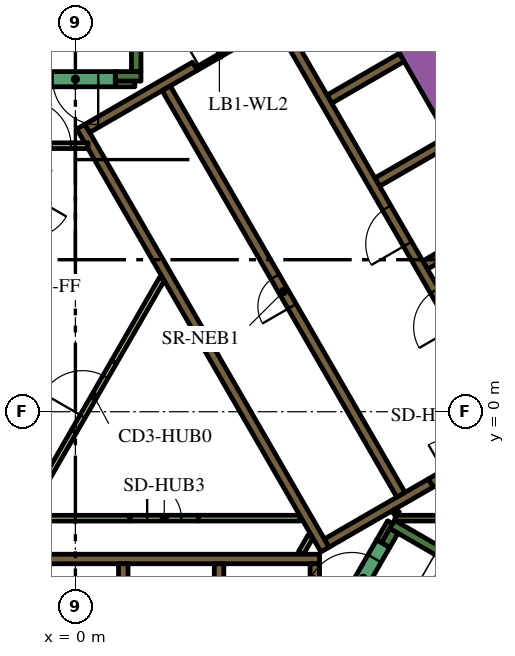
"""IFC4 building model, lengths in metres.
Left out: names, types, materials, properties, quantities, classifications, styles, units other than length and angle.
Written with IfcOpenShell. Run it as: python <this file> out.ifc"""

import sys

from ifc_helpers import new_model, si_unit, direction, frame, frame_2d, origin, place, context, subcontext, project, spatial, polyline, rectangle, outline, extrude, element, fill, save


model = new_model("IFC4")
c1 = context("Model", 3, precision=1e-05, world=origin(), true_north=direction((0.0, 1.0)))
c2 = subcontext(c1, "Body", "Model", "MODEL_VIEW")
j1 = project(units=[si_unit("LENGTHUNIT", "METRE"), si_unit("PLANEANGLEUNIT", "RADIAN")], contexts=[c1])
p1 = place(None, origin())
s1 = spatial("IfcSite", under=j1, at=p1, CompositionType="ELEMENT")
p2 = place(p1, origin())
s2 = spatial("IfcBuilding", under=s1, at=p2, CompositionType="ELEMENT")
p3 = place(p2, frame((0.0, 0.0, 126.6)))
s3 = spatial("IfcBuildingStorey", under=s2, at=p3, CompositionType="ELEMENT", Elevation=126.6)
p4 = place(p3, frame((6.776, 13.364, 0.0), z_axis=(0.0, 0.0, 1.0), x_axis=(0.500004177138, -0.8660229921, 0.0)))
e1 = element("IfcWall", 1, at=p4, inside=s3, PredefinedType="SOLIDWALL", context=c2, shape_type="SweptSolid", body=[
    extrude(rectangle(XDim=20.204, YDim=0.9, at=frame_2d((10.102, 0.0))), origin(), (0.0, 0.0, 1.0), 3.9),
])
p5 = place(p3, frame((8.334, -2.964, 0.0), z_axis=(0.0, 0.0, 1.0), x_axis=(0.866016039709, -0.500016218704, 0.0)))
e2 = element("IfcWall", 2, at=p5, inside=s3, PredefinedType="SOLIDWALL", context=c2, shape_type="SweptSolid", body=[
    extrude(rectangle(XDim=7.05, YDim=0.25, at=frame_2d((3.525, 0.0))), origin(), (0.0, 0.0, 1.0), 3.9),
])
p6 = place(p3, frame((8.163, -3.511, 0.0), z_axis=(0.0, 0.0, 1.0), x_axis=(0.500127794843, 0.865951608824, 0.0)))
e3 = element("IfcWall", 3, at=p6, inside=s3, PredefinedType="SOLIDWALL", context=c2, shape_type="SweptSolid", body=[
    extrude(rectangle(XDim=0.435, YDim=0.25, at=frame_2d((0.217, 0.0))), origin(), (0.0, 0.0, 1.0), 3.9),
])
p7 = place(p3, frame((1.6, 8.95, 0.0), z_axis=(0.0, 0.0, 1.0), x_axis=(0.0, 1.0, 0.0)))
e4 = element("IfcWall", 4, at=p7, inside=s3, PredefinedType="SOLIDWALL", context=c2, shape_type="SweptSolid", body=[
    extrude(rectangle(XDim=6.8, YDim=0.25, at=frame_2d((3.4, 0.0))), origin(), (0.0, 0.0, 1.0), 3.9),
])
p8 = place(p3, frame((1.05, 8.825, 0.0), z_axis=(0.0, 0.0, 1.0), x_axis=(1.0, 0.0, 0.0)))
e5 = element("IfcWall", 5, at=p8, inside=s3, PredefinedType="SOLIDWALL", context=c2, shape_type="SweptSolid", body=[
    extrude(rectangle(XDim=0.675, YDim=0.25, at=frame_2d((0.337, 0.0))), origin(), (0.0, 0.0, 1.0), 3.9),
])
p9 = place(p3, frame((-6.19, -3.875, 0.0), z_axis=(0.0, 0.0, 1.0), x_axis=(1.0, 0.0, 0.0)))
e6 = element("IfcWall", 6, at=p9, inside=s3, PredefinedType="SOLIDWALL", context=c2, shape_type="SweptSolid", body=[
    extrude(rectangle(XDim=12.615, YDim=0.25, at=frame_2d((6.307, 0.0))), origin(), (0.0, 0.0, 1.0), 3.9),
])
p10 = place(p3, frame((6.3, -7.268, 0.0), z_axis=(0.0, 0.0, 1.0), x_axis=(0.0, 1.0, 0.0)))
e7 = element("IfcWall", 7, at=p10, inside=s3, PredefinedType="SOLIDWALL", context=c2, shape_type="SweptSolid", body=[
    extrude(rectangle(XDim=3.268, YDim=0.25, at=frame_2d((1.634, 0.0))), origin(), (0.0, 0.0, 1.0), 3.9),
])
for number, where, z_axis, x_axis in (
    (8, (3.78, -4.0, 0.0), (0.0, 0.0, 1.0), (0.0, -1.0, 0.0)),
    (9, (1.26, -4.0, 0.0), (0.0, 0.0, 1.0), (0.0, -1.0, 0.0)),
):
    element("IfcWall", number, at=place(p3, frame(where, z_axis=z_axis, x_axis=x_axis)), inside=s3, PredefinedType="SOLIDWALL", context=c2, shape_type="SweptSolid", body=[
        extrude(rectangle(XDim=2.2, YDim=0.25, at=frame_2d((1.1, 0.0))), origin(), (0.0, 0.0, 1.0), 3.9),
    ])
p11 = place(p3, origin())
e10 = element("IfcWall", 10, at=p11, inside=s3, PredefinedType="SOLIDWALL", context=c2, shape_type="SweptSolid", body=[
    extrude(outline(polyline([(0.335, 6.925), (0.335, 6.925), (0.335, 7.075), (0.335, 7.075), (0.335, 7.075), (0.245, 7.075), (0.079, 7.363), (0.035, 7.439), (0.252, 7.564), (0.377, 7.348), (6.552, -3.348), (6.677, -3.564), (6.46, -3.689), (4.897, -0.981), (0.332, 6.925), (0.335, 6.925), (0.335, 6.925)])), origin(), (0.0, 0.0, 1.0), 3.9),
])
p12 = place(p3, frame((0.314, 7.456, 0.0), z_axis=(0.0, 0.0, 1.0), x_axis=(0.866013897511, 0.50001992892, 0.0)))
e11 = element("IfcWall", 11, at=p12, inside=s3, PredefinedType="SOLIDWALL", context=c2, shape_type="SweptSolid", body=[
    extrude(rectangle(XDim=3.268, YDim=0.25, at=frame_2d((1.634, 0.0))), origin(), (0.0, 0.0, 1.0), 3.9),
])
p13 = place(p3, frame((9.352, -1.875, 0.0), z_axis=(0.0, 0.0, 1.0), x_axis=(-0.866024844342, -0.500000968981, 0.0)))
e12 = element("IfcWall", 12, at=p13, inside=s3, PredefinedType="SOLIDWALL", context=c2, shape_type="SweptSolid", body=[
    extrude(rectangle(XDim=3.162, YDim=0.25, at=frame_2d((1.581, 0.0))), origin(), (0.0, 0.0, 1.0), 3.9),
])
for number, where, z_axis, x_axis in (
    (13, (6.684, 8.224, 0.0), (0.0, 0.0, 1.0), (0.866, 0.5, 0.0)),
    (14, (7.944, 6.041, 0.0), (0.0, 0.0, 1.0), (0.866, 0.5, 0.0)),
    (15, (9.204, 3.859, 0.0), (0.0, 0.0, 1.0), (0.866, 0.5, 0.0)),
):
    element("IfcWall", number, at=place(p3, frame(where, z_axis=z_axis, x_axis=x_axis)), inside=s3, PredefinedType="SOLIDWALL", context=c2, shape_type="SweptSolid", body=[
        extrude(rectangle(XDim=2.2, YDim=0.25, at=frame_2d((1.1, 0.0))), origin(), (0.0, 0.0, 1.0), 3.9),
    ])
p14 = place(p3, frame((-6.086, -2.801, 0.0), z_axis=(0.0, 0.0, 1.0), x_axis=(1.0, 0.0, 0.0)))
e16 = element("IfcWall", 16, at=p14, inside=s3, PredefinedType="PARTITIONING", context=c2, shape_type="SweptSolid", body=[
    extrude(rectangle(XDim=7.524, YDim=0.15, at=frame_2d((3.762, 0.0))), origin(), (0.0, 0.0, 1.0), 2.75),
])
p15 = place(p3, frame((-1.208, -2.544, 0.0), z_axis=(0.0, 0.0, 1.0), x_axis=(0.499995339376, 0.86602809458, 0.0)))
e17 = element("IfcWall", 17, at=p15, inside=s3, PredefinedType="PARTITIONING", context=c2, shape_type="SweptSolid", body=[
    extrude(rectangle(XDim=2.349, YDim=0.15, at=frame_2d((1.175, 0.0))), origin(), (0.0, 0.0, 1.0), 2.75),
])
p16 = place(p3, frame((5.936, -3.718, 0.0), z_axis=(0.0, 0.0, 1.0), x_axis=(0.499890179513, 0.866088799389, 0.0)))
e18 = element("IfcWall", 18, at=p16, inside=s3, PredefinedType="PARTITIONING", context=c2, shape_type="SweptSolid", body=[
    extrude(rectangle(XDim=0.504, YDim=0.15, at=frame_2d((0.252, 0.0))), origin(), (0.0, 0.0, 1.0), 2.75),
])
p17 = place(p3, frame((8.412, -2.8, 0.0), z_axis=(0.0, 0.0, 1.0), x_axis=(1.0, 0.0, 0.0)))
e19 = element("IfcWall", 19, at=p17, inside=s3, PredefinedType="PARTITIONING", context=c2, shape_type="SweptSolid", body=[
    extrude(rectangle(XDim=2.702, YDim=0.15, at=frame_2d((1.351, 0.0))), origin(), (0.0, 0.0, 1.0), 3.9),
])
p18 = place(p3, frame((8.459, -2.599, 0.0), z_axis=(0.0, 0.0, 1.0), x_axis=(-0.501919277433, -0.864914469148, 0.0)))
e20 = element("IfcWall", 20, at=p18, inside=s3, PredefinedType="PARTITIONING", context=c2, shape_type="SweptSolid", body=[
    extrude(rectangle(XDim=0.109, YDim=0.15, at=frame_2d((0.054, 0.0))), origin(), (0.0, 0.0, 1.0), 3.9),
])
p19 = place(p3, frame((8.281, -2.907, 0.0), z_axis=(0.0, 0.0, 1.0), x_axis=(-0.500193841991, -0.86591346013, 0.0)))
e21 = element("IfcWall", 21, at=p19, inside=s3, PredefinedType="PARTITIONING", context=c2, shape_type="SweptSolid", body=[
    extrude(rectangle(XDim=0.583, YDim=0.15, at=frame_2d((0.292, 0.0))), origin(), (0.0, 0.0, 1.0), 3.9),
])
p20 = place(p3, frame((3.238, -2.8, 0.0), z_axis=(0.0, 0.0, 1.0), x_axis=(1.0, 0.0, 0.0)))
e22 = element("IfcWall", 22, at=p20, inside=s3, PredefinedType="PARTITIONING", context=c2, shape_type="SweptSolid", body=[
    extrude(rectangle(XDim=2.672, YDim=0.15, at=frame_2d((1.336, 0.0))), origin(), (0.0, 0.0, 1.0), 2.75),
])
p21 = place(p3, frame((1.016, 1.309, 0.0), z_axis=(0.0, 0.0, 1.0), x_axis=(0.49998231768, 0.866035612436, 0.0)))
e23 = element("IfcWall", 23, at=p21, inside=s3, PredefinedType="PARTITIONING", context=c2, shape_type="SweptSolid", body=[
    extrude(rectangle(XDim=2.521, YDim=0.15, at=frame_2d((1.26, 0.0))), origin(), (0.0, 0.0, 1.0), 2.75),
])
p22 = place(p3, frame((1.05, 8.625, 0.0), z_axis=(0.0, 0.0, 1.0), x_axis=(1.0, 0.0, 0.0)))
e24 = element("IfcWall", 24, at=p22, inside=s3, PredefinedType="PARTITIONING", context=c2, shape_type="SweptSolid", body=[
    extrude(rectangle(XDim=0.514, YDim=0.15, at=frame_2d((0.257, 0.0))), origin(), (0.0, 0.0, 1.0), 2.75),
])
p23 = place(p3, frame((11.553, -0.46, 0.0), z_axis=(0.0, 0.0, 1.0), x_axis=(-0.500006514828, 0.866021642414, 0.0)))
e25 = element("IfcWall", 25, at=p23, inside=s3, PredefinedType="SOLIDWALL", context=c2, shape_type="SweptSolid", body=[
    extrude(rectangle(XDim=12.35, YDim=0.25, at=frame_2d((6.175, 0.0))), origin(), (0.0, 0.0, 1.0), 3.9),
])
p24 = place(p23, frame((0.585, 0.0, 0.0)))
e26 = element("IfcOpeningElement", 26, at=p24, cuts=e25, PredefinedType="OPENING", context=c2, shape_type="SweptSolid", body=[
    extrude(rectangle(XDim=1.1, YDim=2.1, at=frame_2d((0.55, 1.05))), frame((0.0, 0.135, 0.0), z_axis=(0.0, -1.0, 0.0), x_axis=(1.0, 0.0, 0.0)), (0.0, 0.0, 1.0), 0.27),
])
p25 = place(p23, frame((3.105, 0.0, 0.0)))
e27 = element("IfcOpeningElement", 27, at=p25, cuts=e25, PredefinedType="OPENING", context=c2, shape_type="SweptSolid", body=[
    extrude(rectangle(XDim=1.1, YDim=2.1, at=frame_2d((0.55, 1.05))), frame((0.0, 0.135, 0.0), z_axis=(0.0, -1.0, 0.0), x_axis=(1.0, 0.0, 0.0)), (0.0, 0.0, 1.0), 0.27),
])
p26 = place(p23, frame((5.625, 0.0, 0.0)))
e28 = element("IfcOpeningElement", 28, at=p26, cuts=e25, PredefinedType="OPENING", context=c2, shape_type="SweptSolid", body=[
    extrude(rectangle(XDim=1.1, YDim=2.1, at=frame_2d((0.55, 1.05))), frame((0.0, 0.135, 0.0), z_axis=(0.0, -1.0, 0.0), x_axis=(1.0, 0.0, 0.0)), (0.0, 0.0, 1.0), 0.27),
])
p27 = place(p3, frame((8.565, -2.185, 0.0), z_axis=(0.0, 0.0, 1.0), x_axis=(-0.499997954832, 0.866026584559, 0.0)))
e29 = element("IfcWall", 29, at=p27, inside=s3, PredefinedType="SOLIDWALL", context=c2, shape_type="SweptSolid", body=[
    extrude(rectangle(XDim=12.35, YDim=0.25, at=frame_2d((6.175, 0.0))), origin(), (0.0, 0.0, 1.0), 3.9),
])
p28 = place(p27, frame((5.725, 0.0, 0.0)))
e30 = element("IfcOpeningElement", 30, at=p28, cuts=e29, PredefinedType="OPENING", context=c2, shape_type="SweptSolid", body=[
    extrude(rectangle(XDim=0.9, YDim=2.1, at=frame_2d((0.45, 1.05))), frame((0.0, 0.135, 0.0), z_axis=(0.0, -1.0, 0.0), x_axis=(1.0, 0.0, 0.0)), (0.0, 0.0, 1.0), 0.27),
])
p29 = place(p3, frame((7.048, -5.292, 0.0), z_axis=(0.0, 0.0, 1.0), x_axis=(0.49994051562, 0.866059744384, 0.0)))
e31 = element("IfcWall", 31, at=p29, inside=s3, PredefinedType="SOLIDWALL", context=c2, shape_type="SweptSolid", body=[
    extrude(rectangle(XDim=2.1, YDim=0.4, at=frame_2d((1.05, 0.0))), origin(), (0.0, 0.0, 1.0), 3.9),
])
p30 = place(p29, frame((0.45, 0.0, 0.0)))
e32 = element("IfcOpeningElement", 32, at=p30, cuts=e31, PredefinedType="OPENING", context=c2, shape_type="SweptSolid", body=[
    extrude(rectangle(XDim=1.2, YDim=2.1, at=frame_2d((0.6, 1.05))), frame((0.0, 0.21, 0.0), z_axis=(0.0, -1.0, 0.0), x_axis=(1.0, 0.0, 0.0)), (0.0, 0.0, 1.0), 0.42),
])
p31 = place(p3, frame((1.05, 8.75, 0.0), z_axis=(0.0, 0.0, 1.0), x_axis=(-1.0, 0.0, 0.0)))
e33 = element("IfcWall", 33, at=p31, inside=s3, PredefinedType="SOLIDWALL", context=c2, shape_type="SweptSolid", body=[
    extrude(rectangle(XDim=2.1, YDim=0.4, at=frame_2d((1.05, 0.0))), origin(), (0.0, 0.0, 1.0), 3.9),
])
p32 = place(p31, frame((0.45, 0.0, 0.0)))
e34 = element("IfcOpeningElement", 34, at=p32, cuts=e33, PredefinedType="OPENING", context=c2, shape_type="SweptSolid", body=[
    extrude(rectangle(XDim=1.2, YDim=2.1, at=frame_2d((0.6, 1.05))), frame((0.0, 0.21, 0.0), z_axis=(0.0, -1.0, 0.0), x_axis=(1.0, 0.0, 0.0)), (0.0, 0.0, 1.0), 0.42),
])
p33 = place(p3, frame((-1.765, 7.0, 0.0), z_axis=(0.0, 0.0, 1.0), x_axis=(1.0, 0.0, 0.0)))
e35 = element("IfcWall", 35, at=p33, inside=s3, PredefinedType="PARTITIONING", context=c2, shape_type="SweptSolid", body=[
    extrude(rectangle(XDim=2.1, YDim=0.15, at=frame_2d((1.05, 0.0))), origin(), (0.0, 0.0, 1.0), 2.75),
])
p34 = place(p33, frame((0.45, 0.0, 0.0)))
e36 = element("IfcOpeningElement", 36, at=p34, cuts=e35, PredefinedType="OPENING", context=c2, shape_type="SweptSolid", body=[
    extrude(rectangle(XDim=1.2, YDim=2.1, at=frame_2d((0.6, 1.05))), frame((0.0, 0.085, 0.0), z_axis=(0.0, -1.0, 0.0), x_axis=(1.0, 0.0, 0.0)), (0.0, 0.0, 1.0), 0.17),
])
p35 = place(p3, frame((-0.034, -0.509, 0.0), z_axis=(0.0, 0.0, 1.0), x_axis=(0.49994051562, 0.866059744384, 0.0)))
e37 = element("IfcWall", 37, at=p35, inside=s3, PredefinedType="PARTITIONING", context=c2, shape_type="SweptSolid", body=[
    extrude(rectangle(XDim=2.1, YDim=0.15, at=frame_2d((1.05, 0.0))), origin(), (0.0, 0.0, 1.0), 2.75),
])
p36 = place(p35, frame((0.45, 0.0, 0.0)))
e38 = element("IfcOpeningElement", 38, at=p36, cuts=e37, PredefinedType="OPENING", context=c2, shape_type="SweptSolid", body=[
    extrude(rectangle(XDim=1.2, YDim=2.1, at=frame_2d((0.6, 1.05))), frame((0.0, 0.085, 0.0), z_axis=(0.0, -1.0, 0.0), x_axis=(1.0, 0.0, 0.0)), (0.0, 0.0, 1.0), 0.17),
])
p37 = place(p3, frame((3.183, 9.02, 0.0), z_axis=(0.0, 0.0, 1.0), x_axis=(0.866034573852, 0.49998411664, 0.0)))
e39 = element("IfcWall", 39, at=p37, inside=s3, PredefinedType="PARTITIONING", context=c2, shape_type="SweptSolid", body=[
    extrude(rectangle(XDim=1.4, YDim=0.09, at=frame_2d((0.7, 0.0))), origin(), (0.0, 0.0, 1.0), 2.75),
])
p38 = place(p37, frame((0.1, 0.0, 0.0)))
e40 = element("IfcOpeningElement", 40, at=p38, cuts=e39, PredefinedType="OPENING", context=c2, shape_type="SweptSolid", body=[
    extrude(rectangle(XDim=1.2, YDim=2.1, at=frame_2d((0.6, 1.05))), frame((0.0, 0.055, 0.0), z_axis=(0.0, -1.0, 0.0), x_axis=(1.0, 0.0, 0.0)), (0.0, 0.0, 1.0), 0.11),
])
p39 = place(p3, frame((9.352, -1.875, 0.0), z_axis=(0.0, 0.0, 1.0), x_axis=(0.865989075817, 0.500062916607, 0.0)))
e41 = element("IfcWall", 41, at=p39, inside=s3, PredefinedType="SOLIDWALL", context=c2, shape_type="SweptSolid", body=[
    extrude(rectangle(XDim=1.8, YDim=0.25, at=frame_2d((0.9, 0.0))), origin(), (0.0, 0.0, 1.0), 3.9),
])
p40 = place(p39, frame((0.45, 0.0, 0.0)))
e42 = element("IfcOpeningElement", 42, at=p40, cuts=e41, PredefinedType="OPENING", context=c2, shape_type="SweptSolid", body=[
    extrude(rectangle(XDim=0.9, YDim=2.1, at=frame_2d((0.45, 1.05))), frame((0.0, 0.135, 0.0), z_axis=(0.0, -1.0, 0.0), x_axis=(1.0, 0.0, 0.0)), (0.0, 0.0, 1.0), 0.27),
])
p41 = place(p3, frame((1.438, -2.8, 0.0), z_axis=(0.0, 0.0, 1.0), x_axis=(1.0, 0.0, 0.0)))
e43 = element("IfcWall", 43, at=p41, inside=s3, PredefinedType="PARTITIONING", context=c2, shape_type="SweptSolid", body=[
    extrude(rectangle(XDim=1.8, YDim=0.15, at=frame_2d((0.9, 0.0))), origin(), (0.0, 0.0, 1.0), 2.75),
])
p42 = place(p41, frame((0.45, 0.0, 0.0)))
e44 = element("IfcOpeningElement", 44, at=p42, cuts=e43, PredefinedType="OPENING", context=c2, shape_type="SweptSolid", body=[
    extrude(rectangle(XDim=0.9, YDim=2.1, at=frame_2d((0.45, 1.05))), frame((0.0, 0.085, 0.0), z_axis=(0.0, -1.0, 0.0), x_axis=(1.0, 0.0, 0.0)), (0.0, 0.0, 1.0), 0.17),
])
p43 = place(p3, frame((6.163, 18.475, 0.0), z_axis=(0.0, 0.0, 1.0), x_axis=(0.500001317485, -0.866024643133, 0.0)))
e45 = element("IfcWall", 45, at=p43, inside=s3, PredefinedType="PARTITIONING", context=c2, shape_type="SweptSolid", body=[
    extrude(rectangle(XDim=25.767, YDim=0.15, at=frame_2d((12.883, 0.0))), origin(), (0.0, 0.0, 1.0), 2.75),
])
p44 = place(p43, frame((19.306, 0.0, 0.0)))
e46 = element("IfcOpeningElement", 46, at=p44, cuts=e45, PredefinedType="OPENING", context=c2, shape_type="SweptSolid", body=[
    extrude(rectangle(XDim=1.0, YDim=2.1, at=frame_2d((0.5, 1.05))), frame((0.0, 0.085, 0.0), z_axis=(0.0, -1.0, 0.0), x_axis=(1.0, 0.0, 0.0)), (0.0, 0.0, 1.0), 0.17),
])
p45 = place(p43, frame((17.999, 0.0, 0.0)))
e47 = element("IfcOpeningElement", 47, at=p45, cuts=e45, PredefinedType="OPENING", context=c2, shape_type="SweptSolid", body=[
    extrude(rectangle(XDim=1.0, YDim=2.1, at=frame_2d((0.5, 1.05))), frame((0.0, 0.085, 0.0), z_axis=(0.0, -1.0, 0.0), x_axis=(1.0, 0.0, 0.0)), (0.0, 0.0, 1.0), 0.17),
])
p46 = place(p43, frame((0.596, 0.0, 0.0)))
e48 = element("IfcOpeningElement", 48, at=p46, cuts=e45, PredefinedType="OPENING", context=c2, shape_type="SweptSolid", body=[
    extrude(rectangle(XDim=1.0, YDim=2.1, at=frame_2d((0.5, 1.05))), frame((0.0, 0.085, 0.0), z_axis=(0.0, -1.0, 0.0), x_axis=(1.0, 0.0, 0.0)), (0.0, 0.0, 1.0), 0.17),
])
p47 = place(p25, origin())
e49 = element("IfcDoor", 49, at=p47, inside=s3, OperationType="DOUBLE_DOOR_SLIDING", PredefinedType="DOOR", context=c2, shape_type="SweptSolid", body=[
    extrude(rectangle(XDim=1.1, YDim=2.1, at=frame_2d((0.55, 1.05))), frame((0.0, 0.025, 0.0), z_axis=(0.0, -1.0, 0.0), x_axis=(1.0, 0.0, 0.0)), (0.0, 0.0, 1.0), 0.05),
])
fill(e27, e49)
p48 = place(p26, origin())
e50 = element("IfcDoor", 50, at=p48, inside=s3, OperationType="DOUBLE_DOOR_SLIDING", PredefinedType="DOOR", context=c2, shape_type="SweptSolid", body=[
    extrude(rectangle(XDim=1.1, YDim=2.1, at=frame_2d((0.55, 1.05))), frame((0.0, 0.025, 0.0), z_axis=(0.0, -1.0, 0.0), x_axis=(1.0, 0.0, 0.0)), (0.0, 0.0, 1.0), 0.05),
])
fill(e28, e50)
p49 = place(p28, origin())
e51 = element("IfcDoor", 51, at=p49, inside=s3, OperationType="SINGLE_SWING_LEFT", PredefinedType="DOOR", context=c2, shape_type="SweptSolid", body=[
    extrude(rectangle(XDim=0.9, YDim=2.1, at=frame_2d((0.45, 1.05))), frame((0.0, 0.025, 0.0), z_axis=(0.0, -1.0, 0.0), x_axis=(1.0, 0.0, 0.0)), (0.0, 0.0, 1.0), 0.05),
])
fill(e30, e51)
p50 = place(p30, origin())
e52 = element("IfcDoor", 52, at=p50, inside=s3, OperationType="SINGLE_SWING_LEFT", PredefinedType="DOOR", context=c2, shape_type="SweptSolid", body=[
    extrude(rectangle(XDim=1.2, YDim=2.1, at=frame_2d((0.6, 1.05))), frame((0.0, 0.025, 0.0), z_axis=(0.0, -1.0, 0.0), x_axis=(1.0, 0.0, 0.0)), (0.0, 0.0, 1.0), 0.05),
])
fill(e32, e52)
p51 = place(p32, origin())
e53 = element("IfcDoor", 53, at=p51, inside=s3, OperationType="SINGLE_SWING_LEFT", PredefinedType="DOOR", context=c2, shape_type="SweptSolid", body=[
    extrude(rectangle(XDim=1.2, YDim=2.1, at=frame_2d((0.6, 1.05))), frame((0.0, 0.025, 0.0), z_axis=(0.0, -1.0, 0.0), x_axis=(1.0, 0.0, 0.0)), (0.0, 0.0, 1.0), 0.05),
])
fill(e34, e53)
p52 = place(p34, origin())
e54 = element("IfcDoor", 54, at=p52, inside=s3, OperationType="SINGLE_SWING_LEFT", PredefinedType="DOOR", context=c2, shape_type="SweptSolid", body=[
    extrude(rectangle(XDim=1.2, YDim=2.1, at=frame_2d((0.6, 1.05))), frame((0.0, 0.025, 0.0), z_axis=(0.0, -1.0, 0.0), x_axis=(1.0, 0.0, 0.0)), (0.0, 0.0, 1.0), 0.05),
])
fill(e36, e54)
p53 = place(p36, origin())
e55 = element("IfcDoor", 55, at=p53, inside=s3, OperationType="SINGLE_SWING_LEFT", PredefinedType="DOOR", context=c2, shape_type="SweptSolid", body=[
    extrude(rectangle(XDim=1.2, YDim=2.1, at=frame_2d((0.6, 1.05))), frame((0.0, 0.025, 0.0), z_axis=(0.0, -1.0, 0.0), x_axis=(1.0, 0.0, 0.0)), (0.0, 0.0, 1.0), 0.05),
])
fill(e38, e55)
p54 = place(p38, origin())
e56 = element("IfcDoor", 56, at=p54, inside=s3, OperationType="SINGLE_SWING_LEFT", PredefinedType="DOOR", context=c2, shape_type="SweptSolid", body=[
    extrude(rectangle(XDim=1.2, YDim=2.1, at=frame_2d((0.6, 1.05))), frame((0.0, 0.025, 0.0), z_axis=(0.0, -1.0, 0.0), x_axis=(1.0, 0.0, 0.0)), (0.0, 0.0, 1.0), 0.05),
])
fill(e40, e56)
p55 = place(p42, origin())
e57 = element("IfcDoor", 57, at=p55, inside=s3, OperationType="SINGLE_SWING_LEFT", PredefinedType="DOOR", context=c2, shape_type="SweptSolid", body=[
    extrude(rectangle(XDim=0.9, YDim=2.1, at=frame_2d((0.45, 1.05))), frame((0.0, 0.025, 0.0), z_axis=(0.0, -1.0, 0.0), x_axis=(1.0, 0.0, 0.0)), (0.0, 0.0, 1.0), 0.05),
])
fill(e44, e57)
save(model, sys.argv[1])
